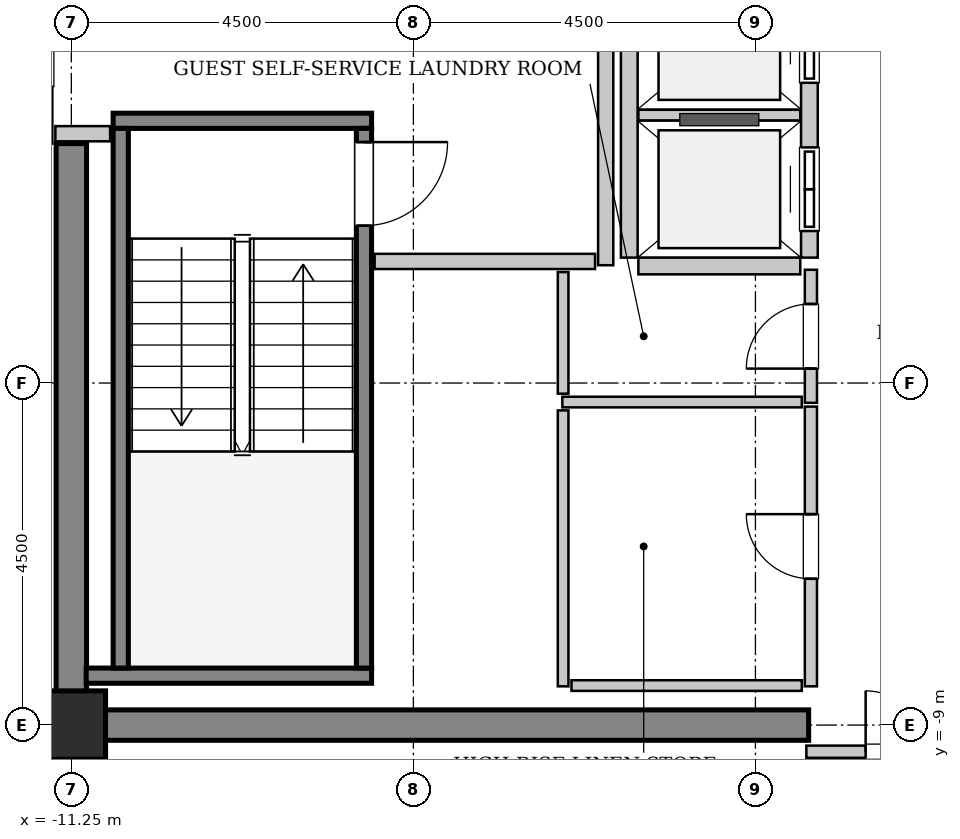
"""IFC4 building model, lengths in metres.
Left out: names, types, materials, properties, quantities, classifications, styles, units other than length and angle.
Written with IfcOpenShell. Run it as: python <this file> out.ifc"""

import sys

from ifc_helpers import new_model, si_unit, direction, frame, frame_2d, origin, origin_2d, place, context, subcontext, project, spatial, rectangle, extrude, source, transform, mapped, element, fill, save


model = new_model("IFC4")
c1 = context("Model", 3, precision=1e-05, world=origin(), true_north=direction((0.0, 1.0)))
c2 = subcontext(c1, "Body", "Model", "MODEL_VIEW")
j1 = project(units=[si_unit("LENGTHUNIT", "METRE"), si_unit("PLANEANGLEUNIT", "RADIAN")], contexts=[c1])
p1 = place(None, origin())
s1 = spatial("IfcSite", under=j1, at=p1, CompositionType="ELEMENT")
p2 = place(p1, origin())
s2 = spatial("IfcBuilding", under=s1, at=p2, CompositionType="ELEMENT")
p3 = place(p2, frame((0.0, 0.0, 330.0)))
s3 = spatial("IfcBuildingStorey", under=s2, at=p3, CompositionType="ELEMENT", Elevation=330.0)
m1 = source(origin(), c2, "Body", "SweptSolid", [
    extrude(rectangle(XDim=9.9, YDim=0.4, at=frame_2d((4.95, 0.0))), origin(), (0.0, 0.0, 1.0), 3.8),
])
p4 = place(p3, frame((-11.45, -9.0, 0.0), z_axis=(0.0, 0.0, 1.0), x_axis=(1.0, 0.0, 0.0)))
e1 = element("IfcWall", 1, at=p4, inside=s3, PredefinedType="SHEAR", context=c2, shape_type="MappedRepresentation", body=[
    mapped(m1, transform((0.0, 0.0, 0.0), x_axis=(1.0, 0.0, 0.0), y_axis=(0.0, 1.0, 0.0), z_axis=(0.0, 0.0, 1.0), scale=1.0)),
])
m2 = source(origin(), c2, "Body", "SweptSolid", [
    extrude(rectangle(XDim=7.45, YDim=0.4, at=frame_2d((3.725, 0.0))), origin(), (0.0, 0.0, 1.0), 3.8),
])
p5 = place(p3, frame((-11.25, -8.8, 0.0), z_axis=(0.0, 0.0, 1.0), x_axis=(0.0, 1.0, 0.0)))
e2 = element("IfcWall", 2, at=p5, inside=s3, PredefinedType="SHEAR", context=c2, shape_type="MappedRepresentation", body=[
    mapped(m2, transform((0.0, 0.0, 0.0), x_axis=(1.0, 0.0, 0.0), y_axis=(0.0, 1.0, 0.0), z_axis=(0.0, 0.0, 1.0), scale=1.0)),
])
m3 = source(origin(), c2, "Body", "SweptSolid", [
    extrude(rectangle(XDim=0.9, YDim=0.9, at=origin_2d()), origin(), (0.0, 0.0, 1.0), 3.8),
])
p6 = place(p3, frame((-11.25, -9.0, 0.0), z_axis=(0.0, 0.0, 1.0), x_axis=(1.0, 0.0, 0.0)))
e3 = element("IfcColumn", 3, at=p6, inside=s3, PredefinedType="COLUMN", context=c2, shape_type="MappedRepresentation", body=[
    mapped(m3, transform((0.0, 0.0, 0.0), x_axis=(1.0, 0.0, 0.0), y_axis=(0.0, 1.0, 0.0), z_axis=(0.0, 0.0, 1.0), scale=1.0)),
])
m4 = source(origin(), c2, "Body", "SweptSolid", [
    extrude(rectangle(XDim=3.4, YDim=0.2, at=frame_2d((1.7, 0.0))), origin(), (0.0, 0.0, 1.0), 3.8),
])
p7 = place(p3, frame((-10.7, -1.05, 0.0), z_axis=(0.0, 0.0, 1.0), x_axis=(1.0, 0.0, 0.0)))
e4 = element("IfcWall", 4, at=p7, inside=s3, PredefinedType="SOLIDWALL", context=c2, shape_type="MappedRepresentation", body=[
    mapped(m4, transform((0.0, 0.0, 0.0), x_axis=(1.0, 0.0, 0.0), y_axis=(0.0, 1.0, 0.0), z_axis=(0.0, 0.0, 1.0), scale=1.0)),
])
m5 = source(origin(), c2, "Body", "SweptSolid", [
    extrude(rectangle(XDim=3.755, YDim=0.2, at=frame_2d((1.877, 0.0))), origin(), (0.0, 0.0, 1.0), 3.8),
])
p8 = place(p3, frame((-11.055, -8.35, 0.0), z_axis=(0.0, 0.0, 1.0), x_axis=(1.0, 0.0, 0.0)))
e5 = element("IfcWall", 5, at=p8, inside=s3, PredefinedType="SOLIDWALL", context=c2, shape_type="MappedRepresentation", body=[
    mapped(m5, transform((0.0, 0.0, 0.0), x_axis=(1.0, 0.0, 0.0), y_axis=(0.0, 1.0, 0.0), z_axis=(0.0, 0.0, 1.0), scale=1.0)),
])
m6 = source(origin(), c2, "Body", "SweptSolid", [
    extrude(rectangle(XDim=7.1, YDim=0.2, at=frame_2d((3.55, 0.0))), origin(), (0.0, 0.0, 1.0), 3.8),
])
p9 = place(p3, frame((-10.6, -1.15, 0.0), z_axis=(0.0, 0.0, 1.0), x_axis=(0.0, -1.0, 0.0)))
e6 = element("IfcWall", 6, at=p9, inside=s3, PredefinedType="SOLIDWALL", context=c2, shape_type="MappedRepresentation", body=[
    mapped(m6, transform((0.0, 0.0, 0.0), x_axis=(1.0, 0.0, 0.0), y_axis=(0.0, 1.0, 0.0), z_axis=(0.0, 0.0, 1.0), scale=1.0)),
])
p10 = place(p3, frame((-7.4, -1.15, 0.0), z_axis=(0.0, 0.0, 1.0), x_axis=(0.0, -1.0, 0.0)))
e7 = element("IfcWall", 7, at=p10, inside=s3, PredefinedType="SOLIDWALL", context=c2, shape_type="MappedRepresentation", body=[
    mapped(m6, transform((0.0, 0.0, 0.0), x_axis=(1.0, 0.0, 0.0), y_axis=(0.0, 1.0, 0.0), z_axis=(0.0, 0.0, 1.0), scale=1.0)),
])
p11 = place(p10, frame((0.18, 0.0, 0.0)))
e8 = element("IfcOpeningElement", 8, at=p11, cuts=e7, PredefinedType="OPENING", context=c2, shape_type="SweptSolid", body=[
    extrude(rectangle(XDim=1.1, YDim=2.15, at=frame_2d((0.55, 1.075))), frame((0.0, 0.11, 0.0), z_axis=(0.0, -1.0, 0.0), x_axis=(1.0, 0.0, 0.0)), (0.0, 0.0, 1.0), 0.22),
])
m7 = source(origin(), c2, "Body", "SweptSolid", [
    extrude(rectangle(XDim=5.7, YDim=0.22, at=frame_2d((2.85, 0.0))), origin(), (0.0, 0.0, 1.0), 3.535),
])
p12 = place(p3, frame((-1.54, -2.85, 0.0), z_axis=(0.0, 0.0, 1.0), x_axis=(0.0, 1.0, 0.0)))
e9 = element("IfcWall", 9, at=p12, inside=s3, PredefinedType="SOLIDWALL", context=c2, shape_type="MappedRepresentation", body=[
    mapped(m7, transform((0.0, 0.0, 0.0), x_axis=(1.0, 0.0, 0.0), y_axis=(0.0, 1.0, 0.0), z_axis=(0.0, 0.0, 1.0), scale=1.0)),
])
p13 = place(p12, frame((0.35, 0.0, 0.0)))
e10 = element("IfcOpeningElement", 10, at=p13, cuts=e9, PredefinedType="OPENING", context=c2, shape_type="SweptSolid", body=[
    extrude(rectangle(XDim=1.1, YDim=2.2, at=frame_2d((0.55, 1.1))), frame((0.0, 0.12, 0.0), z_axis=(0.0, -1.0, 0.0), x_axis=(1.0, 0.0, 0.0)), (0.0, 0.0, 1.0), 0.24),
])
p14 = place(p12, frame((2.3, 0.0, 0.0)))
e11 = element("IfcOpeningElement", 11, at=p14, cuts=e9, PredefinedType="OPENING", context=c2, shape_type="SweptSolid", body=[
    extrude(rectangle(XDim=1.1, YDim=2.2, at=frame_2d((0.55, 1.1))), frame((0.0, 0.12, 0.0), z_axis=(0.0, -1.0, 0.0), x_axis=(1.0, 0.0, 0.0)), (0.0, 0.0, 1.0), 0.24),
])
p15 = place(p12, frame((4.25, 0.0, 0.0)))
e12 = element("IfcOpeningElement", 12, at=p15, cuts=e9, PredefinedType="OPENING", context=c2, shape_type="SweptSolid", body=[
    extrude(rectangle(XDim=1.1, YDim=2.2, at=frame_2d((0.55, 1.1))), frame((0.0, 0.12, 0.0), z_axis=(0.0, -1.0, 0.0), x_axis=(1.0, 0.0, 0.0)), (0.0, 0.0, 1.0), 0.24),
])
p16 = place(p3, frame((-3.91, 2.85, 0.0), z_axis=(0.0, 0.0, 1.0), x_axis=(0.0, -1.0, 0.0)))
e13 = element("IfcWall", 13, at=p16, inside=s3, PredefinedType="SOLIDWALL", context=c2, shape_type="MappedRepresentation", body=[
    mapped(m7, transform((0.0, 0.0, 0.0), x_axis=(1.0, 0.0, 0.0), y_axis=(0.0, 1.0, 0.0), z_axis=(0.0, 0.0, 1.0), scale=1.0)),
])
m8 = source(origin(), c2, "Body", "SweptSolid", [
    extrude(rectangle(XDim=2.13, YDim=0.22, at=frame_2d((1.065, 0.0))), origin(), (0.0, 0.0, 1.0), 3.535),
])
p17 = place(p3, frame((-3.79, -2.96, 0.0), z_axis=(0.0, 0.0, 1.0), x_axis=(1.0, 0.0, 0.0)))
e14 = element("IfcWall", 14, at=p17, inside=s3, PredefinedType="SOLIDWALL", context=c2, shape_type="MappedRepresentation", body=[
    mapped(m8, transform((0.0, 0.0, 0.0), x_axis=(1.0, 0.0, 0.0), y_axis=(0.0, 1.0, 0.0), z_axis=(0.0, 0.0, 1.0), scale=1.0)),
])
m9 = source(origin(), c2, "Body", "SweptSolid", [
    extrude(rectangle(XDim=2.13, YDim=0.14, at=frame_2d((1.065, 0.0))), origin(), (0.0, 0.0, 1.0), 3.535),
])
p18 = place(p3, frame((-3.79, -0.975, 0.0), z_axis=(0.0, 0.0, 1.0), x_axis=(1.0, 0.0, 0.0)))
e15 = element("IfcWall", 15, at=p18, inside=s3, PredefinedType="PARTITIONING", context=c2, shape_type="MappedRepresentation", body=[
    mapped(m9, transform((0.0, 0.0, 0.0), x_axis=(1.0, 0.0, 0.0), y_axis=(0.0, 1.0, 0.0), z_axis=(0.0, 0.0, 1.0), scale=1.0)),
])
m10 = source(origin(), c2, "Body", "SweptSolid", [
    extrude(rectangle(XDim=5.9, YDim=0.2, at=frame_2d((2.95, 0.0))), origin(), (0.0, 0.0, 1.0), 3.535),
])
p19 = place(p3, frame((-4.22, -2.95, 0.0), z_axis=(0.0, 0.0, 1.0), x_axis=(0.0, 1.0, 0.0)))
e16 = element("IfcWall", 16, at=p19, inside=s3, PredefinedType="PARTITIONING", context=c2, shape_type="MappedRepresentation", body=[
    mapped(m10, transform((0.0, 0.0, 0.0), x_axis=(1.0, 0.0, 0.0), y_axis=(0.0, 1.0, 0.0), z_axis=(0.0, 0.0, 1.0), scale=1.0)),
])
m11 = source(origin(), c2, "Body", "SweptSolid", [
    extrude(rectangle(XDim=2.9, YDim=0.2, at=frame_2d((1.45, 0.0))), origin(), (0.0, 0.0, 1.0), 3.535),
])
p20 = place(p3, frame((-7.26, -2.9, 0.0), z_axis=(0.0, 0.0, 1.0), x_axis=(1.0, 0.0, 0.0)))
e17 = element("IfcWall", 17, at=p20, inside=s3, PredefinedType="PARTITIONING", context=c2, shape_type="MappedRepresentation", body=[
    mapped(m11, transform((0.0, 0.0, 0.0), x_axis=(1.0, 0.0, 0.0), y_axis=(0.0, 1.0, 0.0), z_axis=(0.0, 0.0, 1.0), scale=1.0)),
])
m12 = source(origin(), c2, "Body", "SweptSolid", [
    extrude(rectangle(XDim=0.72, YDim=0.2, at=frame_2d((0.36, 0.0))), origin(), (0.0, 0.0, 1.0), 3.535),
])
p21 = place(p3, frame((-11.46, -1.22, 0.0), z_axis=(0.0, 0.0, 1.0), x_axis=(1.0, 0.0, 0.0)))
e18 = element("IfcWall", 18, at=p21, inside=s3, PredefinedType="PARTITIONING", context=c2, shape_type="MappedRepresentation", body=[
    mapped(m12, transform((0.0, 0.0, 0.0), x_axis=(1.0, 0.0, 0.0), y_axis=(0.0, 1.0, 0.0), z_axis=(0.0, 0.0, 1.0), scale=1.0)),
])
m13 = source(origin(), c2, "Body", "SweptSolid", [
    extrude(rectangle(XDim=3.16, YDim=0.16, at=frame_2d((1.58, 0.0))), origin(), (0.0, 0.0, 1.0), 2.625),
])
p22 = place(p3, frame((-1.58, -9.35, 0.0), z_axis=(0.0, 0.0, 1.0), x_axis=(1.0, 0.0, 0.0)))
e19 = element("IfcWall", 19, at=p22, inside=s3, PredefinedType="PARTITIONING", context=c2, shape_type="MappedRepresentation", body=[
    mapped(m13, transform((0.0, 0.0, 0.0), x_axis=(1.0, 0.0, 0.0), y_axis=(0.0, 1.0, 0.0), z_axis=(0.0, 0.0, 1.0), scale=1.0)),
])
p23 = place(p22, frame((0.78, 0.0, 0.0)))
e20 = element("IfcOpeningElement", 20, at=p23, cuts=e19, PredefinedType="OPENING", context=c2, shape_type="SweptSolid", body=[
    extrude(rectangle(XDim=1.6, YDim=2.3, at=frame_2d((0.8, 1.15))), frame((0.0, 0.09, 0.0), z_axis=(0.0, -1.0, 0.0), x_axis=(1.0, 0.0, 0.0)), (0.0, 0.0, 1.0), 0.18),
])
m14 = source(origin(), c2, "Body", "SweptSolid", [
    extrude(rectangle(XDim=1.75, YDim=0.16, at=frame_2d((0.875, 0.0))), origin(), (0.0, 0.0, 1.0), 3.535),
])
p24 = place(p3, frame((-1.52, -4.76, 0.0), z_axis=(0.0, 0.0, 1.0), x_axis=(0.0, 1.0, 0.0)))
e21 = element("IfcWall", 21, at=p24, inside=s3, PredefinedType="PARTITIONING", context=c2, shape_type="MappedRepresentation", body=[
    mapped(m14, transform((0.0, 0.0, 0.0), x_axis=(1.0, 0.0, 0.0), y_axis=(0.0, 1.0, 0.0), z_axis=(0.0, 0.0, 1.0), scale=1.0)),
])
p25 = place(p24, frame((0.45, 0.0, 0.0)))
e22 = element("IfcOpeningElement", 22, at=p25, cuts=e21, PredefinedType="OPENING", context=c2, shape_type="SweptSolid", body=[
    extrude(rectangle(XDim=0.85, YDim=2.1, at=frame_2d((0.425, 1.05))), frame((0.0, 0.09, 0.0), z_axis=(0.0, -1.0, 0.0), x_axis=(1.0, 0.0, 0.0)), (0.0, 0.0, 1.0), 0.18),
])
m15 = source(origin(), c2, "Body", "SweptSolid", [
    extrude(rectangle(XDim=3.15, YDim=0.14, at=frame_2d((1.575, 0.0))), origin(), (0.0, 0.0, 1.0), 3.535),
])
p26 = place(p3, frame((-4.79, -4.75, 0.0), z_axis=(0.0, 0.0, 1.0), x_axis=(1.0, 0.0, 0.0)))
e23 = element("IfcWall", 23, at=p26, inside=s3, PredefinedType="PARTITIONING", context=c2, shape_type="MappedRepresentation", body=[
    mapped(m15, transform((0.0, 0.0, 0.0), x_axis=(1.0, 0.0, 0.0), y_axis=(0.0, 1.0, 0.0), z_axis=(0.0, 0.0, 1.0), scale=1.0)),
])
m16 = source(origin(), c2, "Body", "SweptSolid", [
    extrude(rectangle(XDim=1.6, YDim=0.14, at=frame_2d((0.8, 0.0))), origin(), (0.0, 0.0, 1.0), 3.535),
])
p27 = place(p3, frame((-4.78, -4.64, 0.0), z_axis=(0.0, 0.0, 1.0), x_axis=(0.0, 1.0, 0.0)))
e24 = element("IfcWall", 24, at=p27, inside=s3, PredefinedType="PARTITIONING", context=c2, shape_type="MappedRepresentation", body=[
    mapped(m16, transform((0.0, 0.0, 0.0), x_axis=(1.0, 0.0, 0.0), y_axis=(0.0, 1.0, 0.0), z_axis=(0.0, 0.0, 1.0), scale=1.0)),
])
m17 = source(origin(), c2, "Body", "SweptSolid", [
    extrude(rectangle(XDim=3.68, YDim=0.16, at=frame_2d((1.84, 0.0))), origin(), (0.0, 0.0, 1.0), 3.535),
])
p28 = place(p3, frame((-1.52, -8.49, 0.0), z_axis=(0.0, 0.0, 1.0), x_axis=(0.0, 1.0, 0.0)))
e25 = element("IfcWall", 25, at=p28, inside=s3, PredefinedType="PARTITIONING", context=c2, shape_type="MappedRepresentation", body=[
    mapped(m17, transform((0.0, 0.0, 0.0), x_axis=(1.0, 0.0, 0.0), y_axis=(0.0, 1.0, 0.0), z_axis=(0.0, 0.0, 1.0), scale=1.0)),
])
p29 = place(p28, frame((1.415, 0.0, 0.0)))
e26 = element("IfcOpeningElement", 26, at=p29, cuts=e25, PredefinedType="OPENING", context=c2, shape_type="SweptSolid", body=[
    extrude(rectangle(XDim=0.85, YDim=2.1, at=frame_2d((0.425, 1.05))), frame((0.0, 0.09, 0.0), z_axis=(0.0, -1.0, 0.0), x_axis=(1.0, 0.0, 0.0)), (0.0, 0.0, 1.0), 0.18),
])
m18 = source(origin(), c2, "Body", "SweptSolid", [
    extrude(rectangle(XDim=3.63, YDim=0.14, at=frame_2d((1.815, 0.0))), origin(), (0.0, 0.0, 1.0), 3.535),
])
p30 = place(p3, frame((-4.78, -8.49, 0.0), z_axis=(0.0, 0.0, 1.0), x_axis=(0.0, 1.0, 0.0)))
e27 = element("IfcWall", 27, at=p30, inside=s3, PredefinedType="PARTITIONING", context=c2, shape_type="MappedRepresentation", body=[
    mapped(m18, transform((0.0, 0.0, 0.0), x_axis=(1.0, 0.0, 0.0), y_axis=(0.0, 1.0, 0.0), z_axis=(0.0, 0.0, 1.0), scale=1.0)),
])
m19 = source(origin(), c2, "Body", "SweptSolid", [
    extrude(rectangle(XDim=3.03, YDim=0.14, at=frame_2d((1.515, 0.0))), origin(), (0.0, 0.0, 1.0), 3.535),
])
p31 = place(p3, frame((-4.67, -8.48, 0.0), z_axis=(0.0, 0.0, 1.0), x_axis=(1.0, 0.0, 0.0)))
e28 = element("IfcWall", 28, at=p31, inside=s3, PredefinedType="PARTITIONING", context=c2, shape_type="MappedRepresentation", body=[
    mapped(m19, transform((0.0, 0.0, 0.0), x_axis=(1.0, 0.0, 0.0), y_axis=(0.0, 1.0, 0.0), z_axis=(0.0, 0.0, 1.0), scale=1.0)),
])
m20 = source(origin(), c2, "Body", "SweptSolid", [
    extrude(rectangle(XDim=1.1, YDim=2.15, at=frame_2d((0.55, 1.075))), frame((0.0, 0.025, 0.0), z_axis=(0.0, -1.0, 0.0), x_axis=(1.0, 0.0, 0.0)), (0.0, 0.0, 1.0), 0.05),
])
p32 = place(p11, origin())
e29 = element("IfcDoor", 29, at=p32, inside=s3, OperationType="SINGLE_SWING_LEFT", PredefinedType="DOOR", context=c2, shape_type="MappedRepresentation", body=[
    mapped(m20, transform((0.0, 0.0, 0.0), x_axis=(1.0, 0.0, 0.0), y_axis=(0.0, 1.0, 0.0), z_axis=(0.0, 0.0, 1.0), scale=1.0)),
])
fill(e8, e29)
m21 = source(origin(), c2, "Body", "SweptSolid", [
    extrude(rectangle(XDim=1.1, YDim=2.2, at=frame_2d((0.55, 1.1))), frame((0.0, 0.025, 0.0), z_axis=(0.0, -1.0, 0.0), x_axis=(1.0, 0.0, 0.0)), (0.0, 0.0, 1.0), 0.05),
])
p33 = place(p13, origin())
e30 = element("IfcDoor", 30, at=p33, inside=s3, OperationType="DOUBLE_DOOR_SLIDING", PredefinedType="DOOR", context=c2, shape_type="MappedRepresentation", body=[
    mapped(m21, transform((0.0, 0.0, 0.0), x_axis=(1.0, 0.0, 0.0), y_axis=(0.0, 1.0, 0.0), z_axis=(0.0, 0.0, 1.0), scale=1.0)),
])
fill(e10, e30)
p34 = place(p14, origin())
e31 = element("IfcDoor", 31, at=p34, inside=s3, OperationType="DOUBLE_DOOR_SLIDING", PredefinedType="DOOR", context=c2, shape_type="MappedRepresentation", body=[
    mapped(m21, transform((0.0, 0.0, 0.0), x_axis=(1.0, 0.0, 0.0), y_axis=(0.0, 1.0, 0.0), z_axis=(0.0, 0.0, 1.0), scale=1.0)),
])
fill(e11, e31)
m22 = source(origin(), c2, "Body", "SweptSolid", [
    extrude(rectangle(XDim=1.6, YDim=2.3, at=frame_2d((0.8, 1.15))), frame((0.0, 0.025, 0.0), z_axis=(0.0, -1.0, 0.0), x_axis=(1.0, 0.0, 0.0)), (0.0, 0.0, 1.0), 0.05),
])
p35 = place(p23, origin())
e32 = element("IfcDoor", 32, at=p35, inside=s3, OperationType="DOUBLE_DOOR_SINGLE_SWING", PredefinedType="DOOR", context=c2, shape_type="MappedRepresentation", body=[
    mapped(m22, transform((0.0, 0.0, 0.0), x_axis=(1.0, 0.0, 0.0), y_axis=(0.0, 1.0, 0.0), z_axis=(0.0, 0.0, 1.0), scale=1.0)),
])
fill(e20, e32)
m23 = source(origin(), c2, "Body", "SweptSolid", [
    extrude(rectangle(XDim=0.85, YDim=2.1, at=frame_2d((0.425, 1.05))), frame((0.0, 0.025, 0.0), z_axis=(0.0, -1.0, 0.0), x_axis=(1.0, 0.0, 0.0)), (0.0, 0.0, 1.0), 0.05),
])
p36 = place(p25, origin())
e33 = element("IfcDoor", 33, at=p36, inside=s3, OperationType="SINGLE_SWING_LEFT", PredefinedType="DOOR", context=c2, shape_type="MappedRepresentation", body=[
    mapped(m23, transform((0.0, 0.0, 0.0), x_axis=(1.0, 0.0, 0.0), y_axis=(0.0, 1.0, 0.0), z_axis=(0.0, 0.0, 1.0), scale=1.0)),
])
fill(e22, e33)
p37 = place(p29, origin())
e34 = element("IfcDoor", 34, at=p37, inside=s3, OperationType="SINGLE_SWING_RIGHT", PredefinedType="DOOR", context=c2, shape_type="MappedRepresentation", body=[
    mapped(m23, transform((0.0, 0.0, 0.0), x_axis=(1.0, 0.0, 0.0), y_axis=(0.0, 1.0, 0.0), z_axis=(0.0, 0.0, 1.0), scale=1.0)),
])
fill(e26, e34)
save(model, sys.argv[1])
